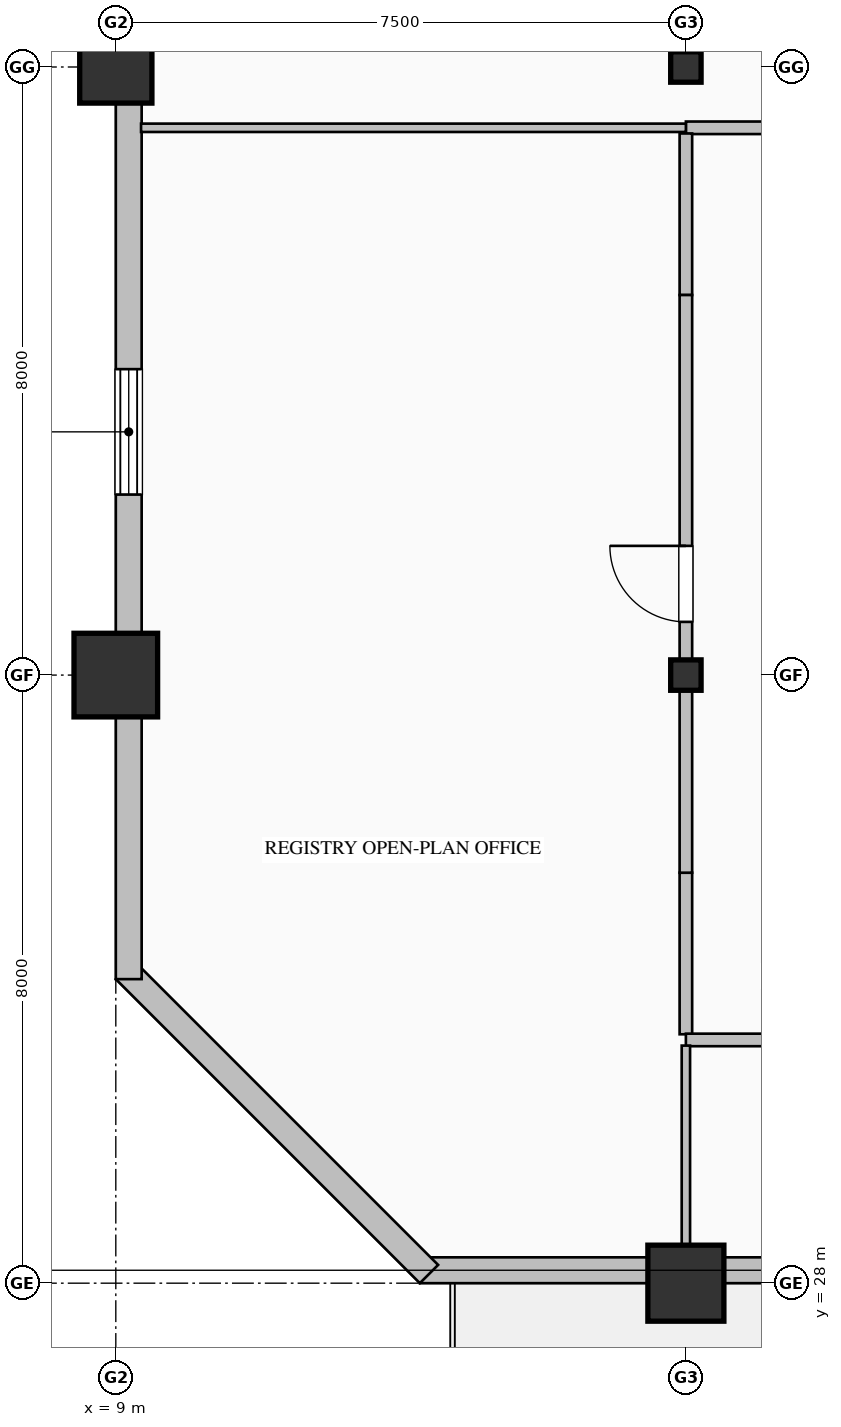
"""IFC4 building model, lengths in metres.
Left out: names, types, materials, properties, quantities, classifications, styles, units other than length and angle.
Written with IfcOpenShell. Run it as: python <this file> out.ifc"""

import sys

from ifc_helpers import new_model, si_unit, direction, frame, frame_2d, origin, origin_2d, place, context, subcontext, project, spatial, rectangle, hollow_rectangle, hollow_circle, i_section, extrude, element, fill, save


model = new_model("IFC4")
c1 = context("Model", 3, precision=1e-05, world=origin(), true_north=direction((0.0, 1.0)))
c2 = subcontext(c1, "Body", "Model", "MODEL_VIEW")
j1 = project(units=[si_unit("LENGTHUNIT", "METRE"), si_unit("PLANEANGLEUNIT", "RADIAN")], contexts=[c1])
p1 = place(None, origin())
s1 = spatial("IfcSite", under=j1, at=p1, CompositionType="ELEMENT")
p2 = place(p1, origin())
s2 = spatial("IfcBuilding", under=s1, at=p2, CompositionType="ELEMENT")
p3 = place(p2, frame((0.0, 0.0, 187.0)))
s3 = spatial("IfcBuildingStorey", under=s2, at=p3, CompositionType="ELEMENT", Elevation=187.0)
p4 = place(p3, frame((9.0, 36.0, 0.0), z_axis=(0.0, 0.0, 1.0), x_axis=(1.0, 0.0, 0.0)))
e1 = element("IfcColumn", 1, at=p4, inside=s3, PredefinedType="COLUMN", context=c2, shape_type="SweptSolid", body=[
    extrude(hollow_rectangle(XDim=1.1, YDim=1.1, WallThickness=0.04, at=origin_2d()), origin(), (0.0, 0.0, 1.0), 4.0),
])
p5 = place(p3, frame((9.0, 44.0, 0.0), z_axis=(0.0, 0.0, 1.0), x_axis=(1.0, 0.0, 0.0)))
e2 = element("IfcColumn", 2, at=p5, inside=s3, PredefinedType="COLUMN", context=c2, shape_type="SweptSolid", body=[
    extrude(hollow_rectangle(XDim=0.95, YDim=0.95, WallThickness=0.036, at=origin_2d()), origin(), (0.0, 0.0, 1.0), 4.0),
])
p6 = place(p3, frame((16.5, 28.0, 0.0), z_axis=(0.0, 0.0, 1.0), x_axis=(1.0, 0.0, 0.0)))
e3 = element("IfcColumn", 3, at=p6, inside=s3, PredefinedType="COLUMN", context=c2, shape_type="SweptSolid", body=[
    extrude(hollow_circle(Radius=0.5, WallThickness=0.036, at=origin_2d()), origin(), (0.0, 0.0, 1.0), 4.0),
])
for number, where, z_axis, x_axis in (
    (4, (16.5, 36.0, 0.0), (0.0, 0.0, 1.0), (1.0, 0.0, 0.0)),
    (5, (16.5, 44.0, 0.0), (0.0, 0.0, 1.0), (1.0, 0.0, 0.0)),
):
    element("IfcColumn", number, at=place(p3, frame(where, z_axis=z_axis, x_axis=x_axis)), inside=s3, PredefinedType="COLUMN", context=c2, shape_type="SweptSolid", body=[
        extrude(i_section(OverallWidth=0.4, OverallDepth=0.4, WebThickness=0.013, FlangeThickness=0.021, FilletRadius=0.022, at=origin_2d()), origin(), (0.0, 0.0, 1.0), 4.0),
    ])
p7 = place(p3, frame((40.52, 28.17, 0.0), z_axis=(0.0, 0.0, 1.0), x_axis=(-1.0, 0.0, 0.0)))
e6 = element("IfcWall", 6, at=p7, inside=s3, PredefinedType="SOLIDWALL", context=c2, shape_type="SweptSolid", body=[
    extrude(rectangle(XDim=27.52, YDim=0.34, at=frame_2d((13.76, 0.0))), origin(), (0.0, 0.0, 1.0), 3.165),
])
p8 = place(p7, frame((17.4, 0.0, 0.7)))
e7 = element("IfcOpeningElement", 7, at=p8, cuts=e6, PredefinedType="OPENING", context=c2, shape_type="SweptSolid", body=[
    extrude(rectangle(XDim=1.2, YDim=1.85, at=frame_2d((0.6, 0.925))), frame((0.0, 0.18, 0.0), z_axis=(0.0, -1.0, 0.0), x_axis=(1.0, 0.0, 0.0)), (0.0, 0.0, 1.0), 0.36),
])
p9 = place(p7, frame((20.85, 0.0, 0.85)))
e8 = element("IfcOpeningElement", 8, at=p9, cuts=e6, PredefinedType="OPENING", context=c2, shape_type="SweptSolid", body=[
    extrude(rectangle(XDim=1.5, YDim=1.95, at=frame_2d((0.75, 0.975))), frame((0.0, 0.18, 0.0), z_axis=(0.0, -1.0, 0.0), x_axis=(1.0, 0.0, 0.0)), (0.0, 0.0, 1.0), 0.36),
])
p10 = place(p7, frame((11.395, 0.0, 0.0)))
e9 = element("IfcOpeningElement", 9, at=p10, cuts=e6, PredefinedType="OPENING", context=c2, shape_type="SweptSolid", body=[
    extrude(rectangle(XDim=1.25, YDim=2.25, at=frame_2d((0.625, 1.125))), frame((0.0, 0.18, 0.0), z_axis=(0.0, -1.0, 0.0), x_axis=(1.0, 0.0, 0.0)), (0.0, 0.0, 1.0), 0.36),
])
p11 = place(p3, frame((13.12, 28.12, 0.0), z_axis=(0.0, 0.0, 1.0), x_axis=(-0.707106781187, 0.707106781187, 0.0)))
e10 = element("IfcWall", 10, at=p11, inside=s3, PredefinedType="SOLIDWALL", context=c2, shape_type="SweptSolid", body=[
    extrude(rectangle(XDim=5.657, YDim=0.34, at=frame_2d((2.828, 0.0))), origin(), (0.0, 0.0, 1.0), 3.765),
])
p12 = place(p3, frame((9.17, 32.0, 0.0), z_axis=(0.0, 0.0, 1.0), x_axis=(0.0, 1.0, 0.0)))
e11 = element("IfcWall", 11, at=p12, inside=s3, PredefinedType="SOLIDWALL", context=c2, shape_type="SweptSolid", body=[
    extrude(rectangle(XDim=16.0, YDim=0.34, at=frame_2d((8.0, 0.0))), origin(), (0.0, 0.0, 1.0), 3.265),
])
p13 = place(p12, frame((6.375, 0.0, 0.85)))
e12 = element("IfcOpeningElement", 12, at=p13, cuts=e11, PredefinedType="OPENING", context=c2, shape_type="SweptSolid", body=[
    extrude(rectangle(XDim=1.65, YDim=1.95, at=frame_2d((0.825, 0.975))), frame((0.0, 0.18, 0.0), z_axis=(0.0, -1.0, 0.0), x_axis=(1.0, 0.0, 0.0)), (0.0, 0.0, 1.0), 0.36),
])
p14 = place(p3, frame((16.5, 31.274, 0.0), z_axis=(0.0, 0.0, 1.0), x_axis=(0.0, 1.0, 0.0)))
e13 = element("IfcWall", 13, at=p14, inside=s3, PredefinedType="PARTITIONING", context=c2, shape_type="SweptSolid", body=[
    extrude(rectangle(XDim=2.125, YDim=0.165, at=frame_2d((1.063, 0.0))), origin(), (0.0, 0.0, 1.0), 3.157),
])
p15 = place(p3, frame((27.0, 31.2, 0.0), z_axis=(0.0, 0.0, 1.0), x_axis=(-1.0, 0.0, 0.0)))
e14 = element("IfcWall", 14, at=p15, inside=s3, PredefinedType="PARTITIONING", context=c2, shape_type="SweptSolid", body=[
    extrude(rectangle(XDim=10.5, YDim=0.165, at=frame_2d((5.25, 0.0))), origin(), (0.0, 0.0, 1.0), 3.765),
])
p16 = place(p15, frame((4.76, 0.0, 0.0)))
e15 = element("IfcOpeningElement", 15, at=p16, cuts=e14, PredefinedType="OPENING", context=c2, shape_type="SweptSolid", body=[
    extrude(rectangle(XDim=0.98, YDim=2.25, at=frame_2d((0.49, 1.125))), frame((0.0, 0.093, 0.0), z_axis=(0.0, -1.0, 0.0), x_axis=(1.0, 0.0, 0.0)), (0.0, 0.0, 1.0), 0.185),
])
p17 = place(p3, frame((16.5, 43.2, 0.0), z_axis=(0.0, 0.0, 1.0), x_axis=(1.0, 0.0, 0.0)))
e16 = element("IfcWall", 16, at=p17, inside=s3, PredefinedType="PARTITIONING", context=c2, shape_type="SweptSolid", body=[
    extrude(rectangle(XDim=6.9, YDim=0.165, at=frame_2d((3.45, 0.0))), origin(), (0.0, 0.0, 1.0), 3.765),
])
p18 = place(p17, frame((2.95, 0.0, 0.0)))
e17 = element("IfcOpeningElement", 17, at=p18, cuts=e16, PredefinedType="OPENING", context=c2, shape_type="SweptSolid", body=[
    extrude(rectangle(XDim=1.0, YDim=2.15, at=frame_2d((0.5, 1.075))), frame((0.0, 0.093, 0.0), z_axis=(0.0, -1.0, 0.0), x_axis=(1.0, 0.0, 0.0)), (0.0, 0.0, 1.0), 0.185),
])
p19 = place(p3, frame((16.5, 41.0, 0.0), z_axis=(0.0, 0.0, 1.0), x_axis=(0.0, 1.0, 0.0)))
e18 = element("IfcWall", 18, at=p19, inside=s3, PredefinedType="PARTITIONING", context=c2, shape_type="SweptSolid", body=[
    extrude(rectangle(XDim=2.125, YDim=0.165, at=frame_2d((1.063, 0.0))), origin(), (0.0, 0.0, 1.0), 3.157),
])
p20 = place(p3, frame((16.5, 33.4, 0.0), z_axis=(0.0, 0.0, 1.0), x_axis=(0.0, 1.0, 0.0)))
e19 = element("IfcWall", 19, at=p20, inside=s3, PredefinedType="PARTITIONING", context=c2, shape_type="SweptSolid", body=[
    extrude(rectangle(XDim=7.6, YDim=0.165, at=frame_2d((3.8, 0.0))), origin(), (0.0, 0.0, 1.0), 3.157),
])
p21 = place(p20, frame((3.3, 0.0, 0.0)))
e20 = element("IfcOpeningElement", 20, at=p21, cuts=e19, PredefinedType="OPENING", context=c2, shape_type="SweptSolid", body=[
    extrude(rectangle(XDim=1.0, YDim=2.15, at=frame_2d((0.5, 1.075))), frame((0.0, 0.093, 0.0), z_axis=(0.0, -1.0, 0.0), x_axis=(1.0, 0.0, 0.0)), (0.0, 0.0, 1.0), 0.185),
])
p22 = place(p3, frame((16.5, 43.2, 0.0), z_axis=(0.0, 0.0, 1.0), x_axis=(-1.0, 0.0, 0.0)))
e21 = element("IfcWall", 21, at=p22, inside=s3, PredefinedType="MOVABLE", context=c2, shape_type="SweptSolid", body=[
    extrude(rectangle(XDim=7.168, YDim=0.11, at=frame_2d((3.584, 0.0))), origin(), (0.0, 0.0, 1.0), 3.765),
])
p23 = place(p3, frame((16.5, 31.125, 0.0), z_axis=(0.0, 0.0, 1.0), x_axis=(0.0, -1.0, 0.0)))
e22 = element("IfcWall", 22, at=p23, inside=s3, PredefinedType="MOVABLE", context=c2, shape_type="SweptSolid", body=[
    extrude(rectangle(XDim=2.793, YDim=0.11, at=frame_2d((1.397, 0.0))), origin(), (0.0, 0.0, 1.0), 3.157),
])
p24 = place(p13, origin())
e23 = element("IfcWindow", 23, at=p24, inside=s3, PartitioningType="DOUBLE_PANEL_VERTICAL", PredefinedType="WINDOW", context=c2, shape_type="SweptSolid", body=[
    extrude(rectangle(XDim=1.65, YDim=1.95, at=frame_2d((0.825, 0.975))), frame((0.0, 0.15, 0.0), z_axis=(0.0, -1.0, 0.0), x_axis=(1.0, 0.0, 0.0)), (0.0, 0.0, 1.0), 0.06),
])
fill(e12, e23)
p25 = place(p21, origin())
e24 = element("IfcDoor", 24, at=p25, inside=s3, OperationType="SINGLE_SWING_RIGHT", PredefinedType="DOOR", context=c2, shape_type="SweptSolid", body=[
    extrude(rectangle(XDim=1.0, YDim=2.15, at=frame_2d((0.5, 1.075))), frame((0.0, 0.025, 0.0), z_axis=(0.0, -1.0, 0.0), x_axis=(1.0, 0.0, 0.0)), (0.0, 0.0, 1.0), 0.05),
])
fill(e20, e24)
save(model, sys.argv[1])
